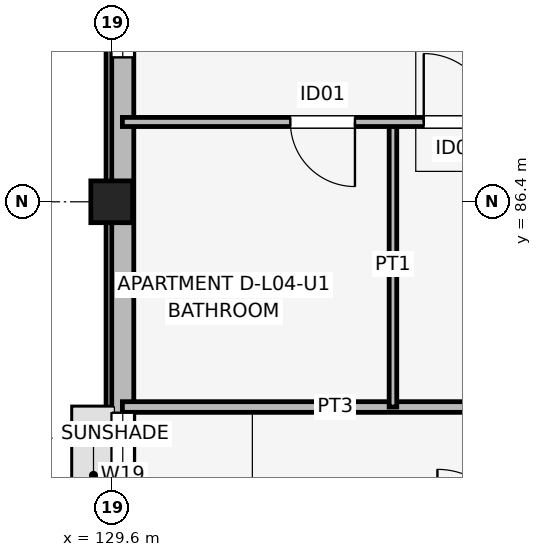
"""IFC4 building model, lengths in metres.
Left out: names, types, materials, properties, quantities, classifications, styles, units other than length and angle.
Written with IfcOpenShell. Run it as: python <this file> out.ifc"""

import sys

from ifc_helpers import new_model, si_unit, direction, frame, frame_2d, origin, origin_2d, place, context, subcontext, project, spatial, rectangle, extrude, element, fill, save


model = new_model("IFC4")
c1 = context("Model", 3, precision=1e-05, world=origin(), true_north=direction((0.0, 1.0)))
c2 = subcontext(c1, "Body", "Model", "MODEL_VIEW")
j1 = project(units=[si_unit("LENGTHUNIT", "METRE"), si_unit("PLANEANGLEUNIT", "RADIAN")], contexts=[c1])
p1 = place(None, origin())
s1 = spatial("IfcSite", under=j1, at=p1, CompositionType="ELEMENT")
p2 = place(p1, origin())
s2 = spatial("IfcBuilding", under=s1, at=p2, CompositionType="ELEMENT")
p3 = place(p2, frame((0.0, 0.0, 15.0)))
s3 = spatial("IfcBuildingStorey", under=s2, at=p3, CompositionType="ELEMENT", Elevation=15.0)
p4 = place(p3, frame((129.6, 86.4, 0.0), z_axis=(0.0, 0.0, 1.0), x_axis=(1.0, 0.0, 0.0)))
e1 = element("IfcColumn", 1, at=p4, inside=s3, PredefinedType="COLUMN", context=c2, shape_type="SweptSolid", body=[
    extrude(rectangle(XDim=0.55, YDim=0.55, at=origin_2d()), origin(), (0.0, 0.0, 1.0), 3.15),
])
p5 = place(p3, frame((129.745, 90.8, 0.0), z_axis=(0.0, 0.0, 1.0), x_axis=(0.0, -1.0, 0.0)))
e2 = element("IfcWall", 2, at=p5, inside=s3, PredefinedType="SOLIDWALL", context=c2, shape_type="SweptSolid", body=[
    extrude(rectangle(XDim=16.0, YDim=0.29, at=frame_2d((8.0, 0.0))), origin(), (0.0, 0.0, 1.0), 2.38),
])
p6 = place(p5, frame((7.175, 0.0, 1.05)))
e3 = element("IfcOpeningElement", 3, at=p6, cuts=e2, PredefinedType="OPENING", context=c2, shape_type="SweptSolid", body=[
    extrude(rectangle(XDim=1.65, YDim=1.15, at=frame_2d((0.825, 0.575))), frame((0.0, 0.155, 0.0), z_axis=(0.0, -1.0, 0.0), x_axis=(1.0, 0.0, 0.0)), (0.0, 0.0, 1.0), 0.31),
])
p7 = place(p5, frame((1.08, 0.0, 0.67)))
e4 = element("IfcOpeningElement", 4, at=p7, cuts=e2, PredefinedType="OPENING", context=c2, shape_type="SweptSolid", body=[
    extrude(rectangle(XDim=1.42, YDim=1.6, at=frame_2d((0.71, 0.8))), frame((0.0, 0.155, 0.0), z_axis=(0.0, -1.0, 0.0), x_axis=(1.0, 0.0, 0.0)), (0.0, 0.0, 1.0), 0.31),
])
p8 = place(p3, frame((129.74, 83.7, 0.0), z_axis=(0.0, 0.0, 1.0), x_axis=(1.0, 0.0, 0.0)))
e5 = element("IfcWall", 5, at=p8, inside=s3, PredefinedType="PARTITIONING", context=c2, shape_type="SweptSolid", body=[
    extrude(rectangle(XDim=6.92, YDim=0.14, at=frame_2d((3.46, 0.0))), origin(), (0.0, 0.0, 1.0), 2.38),
])
p9 = place(p8, frame((5.605, 0.0, 0.0)))
e6 = element("IfcOpeningElement", 6, at=p9, cuts=e5, PredefinedType="OPENING", context=c2, shape_type="SweptSolid", body=[
    extrude(rectangle(XDim=0.98, YDim=2.1, at=frame_2d((0.49, 1.05))), frame((0.0, 0.08, 0.0), z_axis=(0.0, -1.0, 0.0), x_axis=(1.0, 0.0, 0.0)), (0.0, 0.0, 1.0), 0.16),
])
p10 = place(p3, frame((133.3, 83.7, 0.0), z_axis=(0.0, 0.0, 1.0), x_axis=(0.0, 1.0, 0.0)))
e7 = element("IfcWall", 7, at=p10, inside=s3, PredefinedType="PARTITIONING", context=c2, shape_type="SweptSolid", body=[
    extrude(rectangle(XDim=3.75, YDim=0.1, at=frame_2d((1.875, 0.0))), origin(), (0.0, 0.0, 1.0), 2.375),
])
p11 = place(p3, frame((129.74, 87.45, 0.0), z_axis=(0.0, 0.0, 1.0), x_axis=(1.0, 0.0, 0.0)))
e8 = element("IfcWall", 8, at=p11, inside=s3, PredefinedType="PARTITIONING", context=c2, shape_type="SweptSolid", body=[
    extrude(rectangle(XDim=6.92, YDim=0.12, at=frame_2d((3.46, 0.0))), origin(), (0.0, 0.0, 1.0), 2.38),
])
p12 = place(p11, frame((3.06, 0.0, 0.0), z_axis=(0.0, 0.0, 1.0), x_axis=(-1.0, 0.0, 0.0)))
e9 = element("IfcOpeningElement", 9, at=p12, cuts=e8, PredefinedType="OPENING", context=c2, shape_type="SweptSolid", body=[
    extrude(rectangle(XDim=0.85, YDim=2.08, at=frame_2d((0.425, 1.04))), frame((0.0, 0.07, 0.0), z_axis=(0.0, -1.0, 0.0), x_axis=(1.0, 0.0, 0.0)), (0.0, 0.0, 1.0), 0.14),
])
p13 = place(p11, frame((3.965, 0.0, 0.0)))
e10 = element("IfcOpeningElement", 10, at=p13, cuts=e8, PredefinedType="OPENING", context=c2, shape_type="SweptSolid", body=[
    extrude(rectangle(XDim=0.9, YDim=2.08, at=frame_2d((0.45, 1.04))), frame((0.0, 0.07, 0.0), z_axis=(0.0, -1.0, 0.0), x_axis=(1.0, 0.0, 0.0)), (0.0, 0.0, 1.0), 0.14),
])
p14 = place(p11, frame((6.57, 0.0, 0.0), z_axis=(0.0, 0.0, 1.0), x_axis=(-1.0, 0.0, 0.0)))
e11 = element("IfcOpeningElement", 11, at=p14, cuts=e8, PredefinedType="OPENING", context=c2, shape_type="SweptSolid", body=[
    extrude(rectangle(XDim=0.95, YDim=2.08, at=frame_2d((0.475, 1.04))), frame((0.0, 0.07, 0.0), z_axis=(0.0, -1.0, 0.0), x_axis=(1.0, 0.0, 0.0)), (0.0, 0.0, 1.0), 0.14),
])
p15 = place(p6, origin())
e12 = element("IfcWindow", 12, at=p15, inside=s3, PartitioningType="SINGLE_PANEL", PredefinedType="WINDOW", context=c2, shape_type="SweptSolid", body=[
    extrude(rectangle(XDim=1.65, YDim=1.15, at=frame_2d((0.825, 0.575))), frame((0.0, 0.03, 0.0), z_axis=(0.0, -1.0, 0.0), x_axis=(1.0, 0.0, 0.0)), (0.0, 0.0, 1.0), 0.06),
])
fill(e3, e12)
p16 = place(p7, origin())
e13 = element("IfcWindow", 13, at=p16, inside=s3, PartitioningType="SINGLE_PANEL", PredefinedType="WINDOW", context=c2, shape_type="SweptSolid", body=[
    extrude(rectangle(XDim=1.42, YDim=1.6, at=frame_2d((0.71, 0.8))), frame((0.0, 0.03, 0.0), z_axis=(0.0, -1.0, 0.0), x_axis=(1.0, 0.0, 0.0)), (0.0, 0.0, 1.0), 0.06),
])
fill(e4, e13)
p17 = place(p12, origin())
e14 = element("IfcDoor", 14, at=p17, inside=s3, OperationType="SINGLE_SWING_RIGHT", PredefinedType="DOOR", context=c2, shape_type="SweptSolid", body=[
    extrude(rectangle(XDim=0.85, YDim=2.08, at=frame_2d((0.425, 1.04))), frame((0.0, 0.025, 0.0), z_axis=(0.0, -1.0, 0.0), x_axis=(1.0, 0.0, 0.0)), (0.0, 0.0, 1.0), 0.05),
])
fill(e9, e14)
p18 = place(p13, origin())
e15 = element("IfcDoor", 15, at=p18, inside=s3, OperationType="SINGLE_SWING_LEFT", PredefinedType="DOOR", context=c2, shape_type="SweptSolid", body=[
    extrude(rectangle(XDim=0.9, YDim=2.08, at=frame_2d((0.45, 1.04))), frame((0.0, 0.025, 0.0), z_axis=(0.0, -1.0, 0.0), x_axis=(1.0, 0.0, 0.0)), (0.0, 0.0, 1.0), 0.05),
])
fill(e10, e15)
save(model, sys.argv[1])
